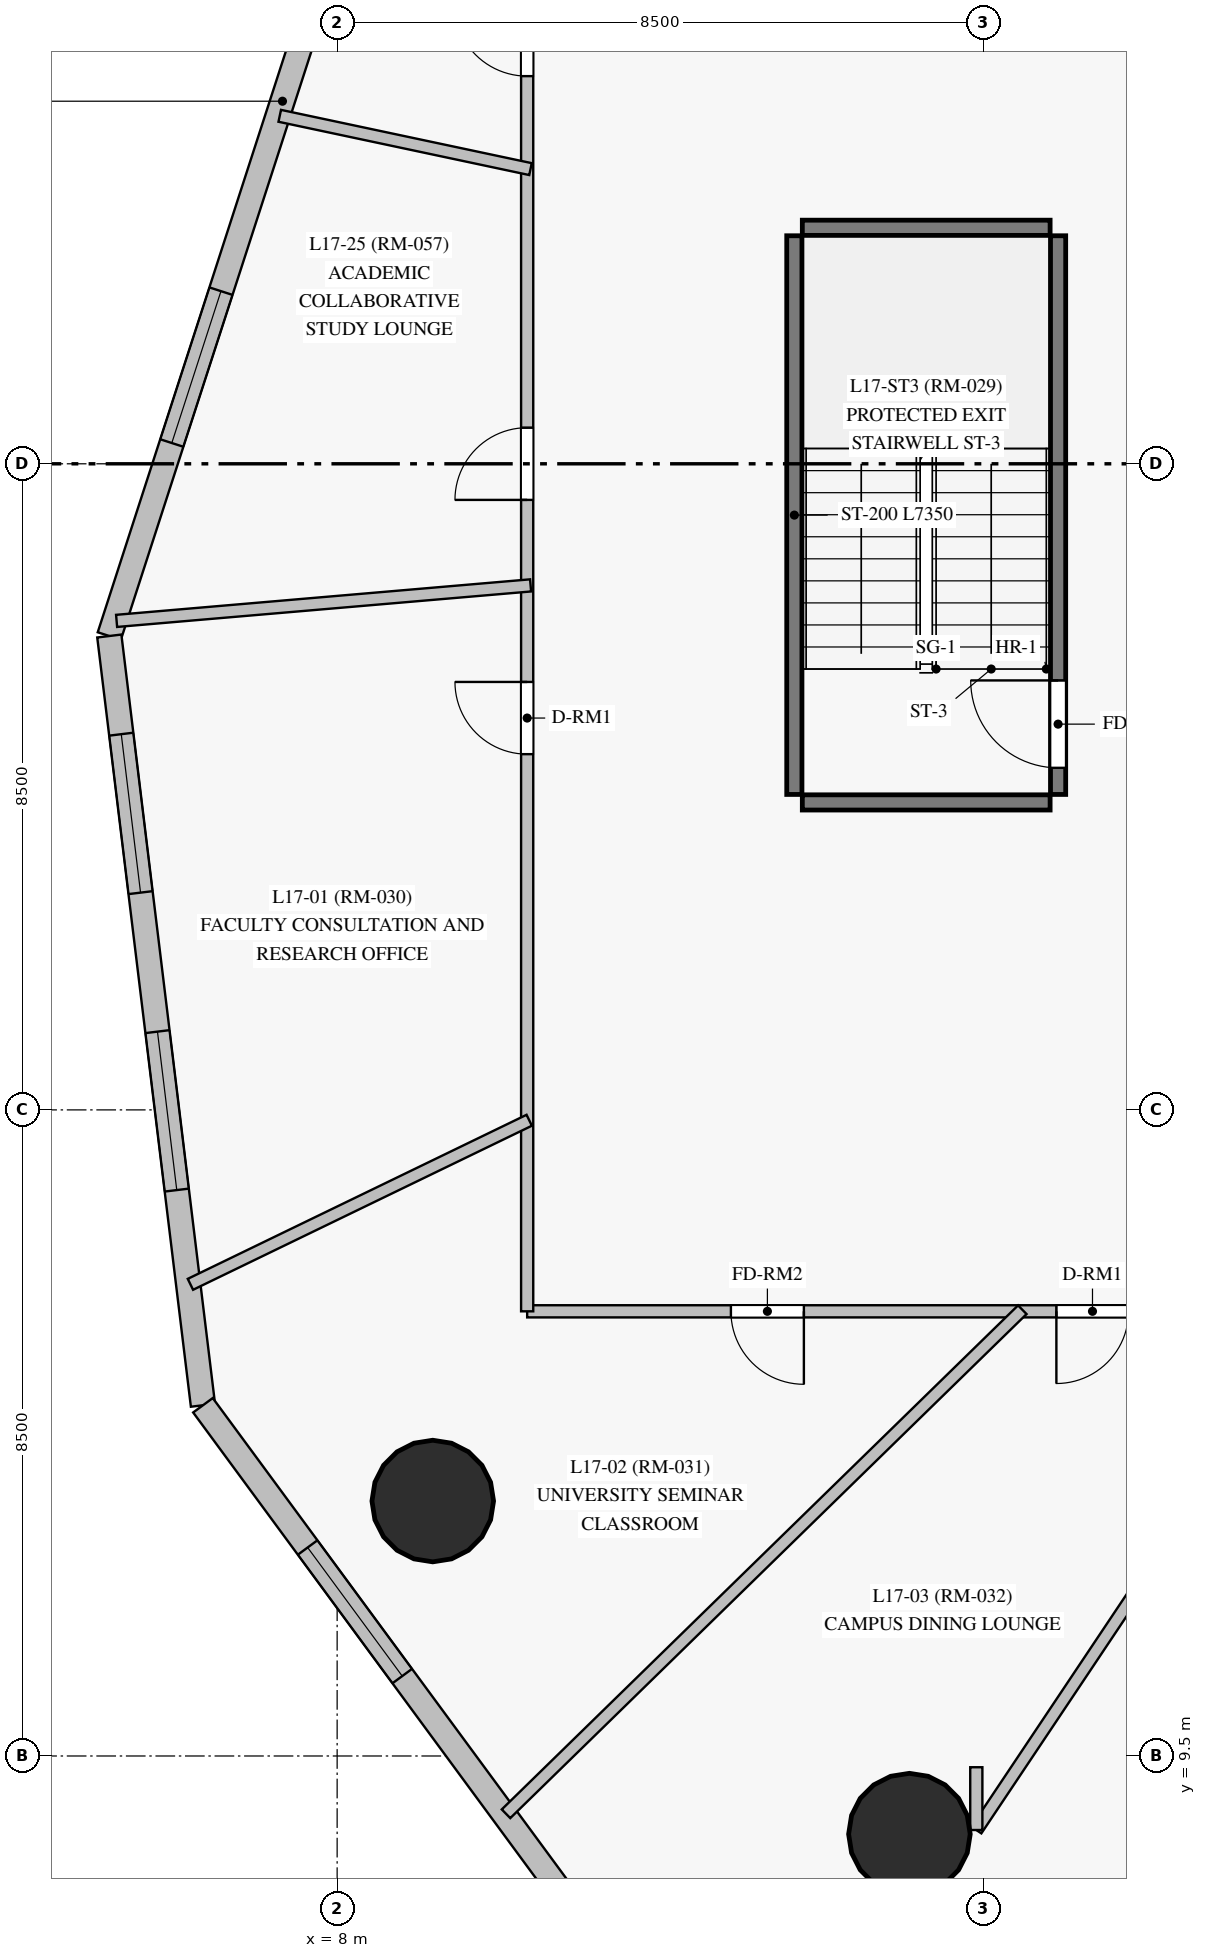
"""IFC4 building model, lengths in metres.
Left out: names, types, materials, properties, quantities, classifications, styles, units other than length and angle.
Written with IfcOpenShell. Run it as: python <this file> out.ifc"""

import sys

from ifc_helpers import new_model, si_unit, direction, frame, frame_2d, origin, origin_with_axes, origin_2d, place, context, subcontext, project, spatial, rectangle, circle, extrude, source, transform, mapped, element, fill, save


model = new_model("IFC4")
c1 = context("Model", 3, precision=1e-05, world=origin(), true_north=direction((0.0, 1.0)))
c2 = subcontext(c1, "Body", "Model", "MODEL_VIEW")
j1 = project(units=[si_unit("LENGTHUNIT", "METRE"), si_unit("PLANEANGLEUNIT", "RADIAN")], contexts=[c1])
p1 = place(None, origin())
s1 = spatial("IfcSite", under=j1, at=p1, CompositionType="ELEMENT")
p2 = place(p1, origin())
s2 = spatial("IfcBuilding", under=s1, at=p2, CompositionType="ELEMENT")
p3 = place(p2, frame((0.0, 0.0, 66.1)))
s3 = spatial("IfcBuildingStorey", under=s2, at=p3, CompositionType="ELEMENT", Elevation=66.1)
m1 = source(origin_with_axes(), c2, "Body", "SweptSolid", [
    extrude(circle(Radius=0.8, at=origin_2d()), origin(), (0.0, 0.0, 1.0), 3.6),
])
for number, where, z_axis, x_axis in (
    (1, (9.258, 12.854, 0.0), (0.0, 0.0, 1.0), (1.0, 0.0, 0.0)),
    (2, (15.529, 8.472, 0.0), (0.0, 0.0, 1.0), (1.0, 0.0, 0.0)),
):
    element("IfcColumn", number, at=place(p3, frame(where, z_axis=z_axis, x_axis=x_axis)), inside=s3, PredefinedType="COLUMN", context=c2, shape_type="MappedRepresentation", body=[
        mapped(m1, transform((0.0, 0.0, 0.0), scale=1.0)),
    ])
p4 = place(p3, frame((9.559, 38.306, 0.0), z_axis=(0.0, 0.0, 1.0), x_axis=(-0.30804045588, -0.95137325879, 0.0)))
e3 = element("IfcWall", 3, at=p4, inside=s3, PredefinedType="SOLIDWALL", context=c2, shape_type="SweptSolid", body=[
    extrude(rectangle(XDim=14.791, YDim=0.32, at=frame_2d((7.396, 0.0))), origin(), (0.0, 0.0, 1.0), 3.35),
])
p5 = place(p4, frame((1.052, 0.0, 0.85)))
e4 = element("IfcOpeningElement", 4, at=p5, cuts=e3, PredefinedType="OPENING", context=c2, shape_type="SweptSolid", body=[
    extrude(rectangle(XDim=2.1, YDim=1.95, at=frame_2d((1.05, 0.975))), frame((0.0, 0.17, 0.0), z_axis=(0.0, -1.0, 0.0), x_axis=(1.0, 0.0, 0.0)), (0.0, 0.0, 1.0), 0.34),
])
p6 = place(p4, frame((4.494, 0.0, 0.85)))
e5 = element("IfcOpeningElement", 5, at=p6, cuts=e3, PredefinedType="OPENING", context=c2, shape_type="SweptSolid", body=[
    extrude(rectangle(XDim=2.1, YDim=1.95, at=frame_2d((1.05, 0.975))), frame((0.0, 0.17, 0.0), z_axis=(0.0, -1.0, 0.0), x_axis=(1.0, 0.0, 0.0)), (0.0, 0.0, 1.0), 0.34),
])
p7 = place(p4, frame((10.022, 0.0, 0.85)))
e6 = element("IfcOpeningElement", 6, at=p7, cuts=e3, PredefinedType="OPENING", context=c2, shape_type="SweptSolid", body=[
    extrude(rectangle(XDim=2.1, YDim=1.95, at=frame_2d((1.05, 0.975))), frame((0.0, 0.17, 0.0), z_axis=(0.0, -1.0, 0.0), x_axis=(1.0, 0.0, 0.0)), (0.0, 0.0, 1.0), 0.34),
])
p8 = place(p3, frame((5.003, 24.234, 0.0), z_axis=(0.0, 0.0, 1.0), x_axis=(0.120836253114, -0.992672453498, 0.0)))
e7 = element("IfcWall", 7, at=p8, inside=s3, PredefinedType="SOLIDWALL", context=c2, shape_type="SweptSolid", body=[
    extrude(rectangle(XDim=10.195, YDim=0.32, at=frame_2d((5.098, 0.0))), origin(), (0.0, 0.0, 1.0), 3.35),
])
p9 = place(p8, frame((1.301, 0.0, 0.85)))
e8 = element("IfcOpeningElement", 8, at=p9, cuts=e7, PredefinedType="OPENING", context=c2, shape_type="SweptSolid", body=[
    extrude(rectangle(XDim=2.1, YDim=1.95, at=frame_2d((1.05, 0.975))), frame((0.0, 0.17, 0.0), z_axis=(0.0, -1.0, 0.0), x_axis=(1.0, 0.0, 0.0)), (0.0, 0.0, 1.0), 0.34),
])
p10 = place(p8, frame((5.243, 0.0, 0.85)))
e9 = element("IfcOpeningElement", 9, at=p10, cuts=e7, PredefinedType="OPENING", context=c2, shape_type="SweptSolid", body=[
    extrude(rectangle(XDim=2.1, YDim=1.95, at=frame_2d((1.05, 0.975))), frame((0.0, 0.17, 0.0), z_axis=(0.0, -1.0, 0.0), x_axis=(1.0, 0.0, 0.0)), (0.0, 0.0, 1.0), 0.34),
])
p11 = place(p3, frame((6.235, 14.114, 0.0), z_axis=(0.0, 0.0, 1.0), x_axis=(0.59272320353, -0.805406235385, 0.0)))
e10 = element("IfcWall", 10, at=p11, inside=s3, PredefinedType="SOLIDWALL", context=c2, shape_type="SweptSolid", body=[
    extrude(rectangle(XDim=12.674, YDim=0.32, at=frame_2d((6.337, 0.0))), origin(), (0.0, 0.0, 1.0), 3.35),
])
p12 = place(p11, frame((2.323, 0.0, 0.85)))
e11 = element("IfcOpeningElement", 11, at=p12, cuts=e10, PredefinedType="OPENING", context=c2, shape_type="SweptSolid", body=[
    extrude(rectangle(XDim=2.1, YDim=1.95, at=frame_2d((1.05, 0.975))), frame((0.0, 0.17, 0.0), z_axis=(0.0, -1.0, 0.0), x_axis=(1.0, 0.0, 0.0)), (0.0, 0.0, 1.0), 0.34),
])
p13 = place(p11, frame((8.431, 0.0, 0.85)))
e12 = element("IfcOpeningElement", 12, at=p13, cuts=e10, PredefinedType="OPENING", context=c2, shape_type="SweptSolid", body=[
    extrude(rectangle(XDim=2.1, YDim=1.95, at=frame_2d((1.05, 0.975))), frame((0.0, 0.17, 0.0), z_axis=(0.0, -1.0, 0.0), x_axis=(1.0, 0.0, 0.0)), (0.0, 0.0, 1.0), 0.34),
])
p14 = place(p3, frame((14.015, 22.15, 0.0), z_axis=(0.0, 0.0, 1.0), x_axis=(0.0, 1.0, 0.0)))
e13 = element("IfcWall", 13, at=p14, inside=s3, PredefinedType="SHEAR", context=c2, shape_type="SweptSolid", body=[
    extrude(rectangle(XDim=7.35, YDim=0.2, at=frame_2d((3.675, 0.0))), origin(), (0.0, 0.0, 1.0), 3.35),
])
p15 = place(p3, frame((17.485, 22.15, 0.0), z_axis=(0.0, 0.0, 1.0), x_axis=(0.0, 1.0, 0.0)))
e14 = element("IfcWall", 14, at=p15, inside=s3, PredefinedType="SHEAR", context=c2, shape_type="SweptSolid", body=[
    extrude(rectangle(XDim=7.35, YDim=0.2, at=frame_2d((3.675, 0.0))), origin(), (0.0, 0.0, 1.0), 3.35),
])
p16 = place(p15, frame((0.35, 0.0, 0.0)))
e15 = element("IfcOpeningElement", 15, at=p16, cuts=e14, PredefinedType="OPENING", context=c2, shape_type="SweptSolid", body=[
    extrude(rectangle(XDim=1.15, YDim=2.15, at=frame_2d((0.575, 1.075))), frame((0.0, 0.11, 0.0), z_axis=(0.0, -1.0, 0.0), x_axis=(1.0, 0.0, 0.0)), (0.0, 0.0, 1.0), 0.22),
])
for number, where, z_axis, x_axis in (
    (16, (14.12, 22.045, 0.0), (0.0, 0.0, 1.0), (1.0, 0.0, 0.0)),
    (17, (14.12, 29.605, 0.0), (0.0, 0.0, 1.0), (1.0, 0.0, 0.0)),
):
    element("IfcWall", number, at=place(p3, frame(where, z_axis=z_axis, x_axis=x_axis)), inside=s3, PredefinedType="SHEAR", context=c2, shape_type="SweptSolid", body=[
        extrude(rectangle(XDim=3.26, YDim=0.2, at=frame_2d((1.63, 0.0))), origin(), (0.0, 0.0, 1.0), 3.35),
    ])
p17 = place(p3, frame((40.25, 15.35, 0.0), z_axis=(0.0, 0.0, 1.0), x_axis=(-1.0, 0.0, 0.0)))
e18 = element("IfcWall", 18, at=p17, inside=s3, PredefinedType="PARTITIONING", context=c2, shape_type="SweptSolid", body=[
    extrude(rectangle(XDim=29.75, YDim=0.16, at=frame_2d((14.875, 0.0))), origin(), (0.0, 0.0, 1.0), 2.7),
])
p18 = place(p17, frame((26.11, 0.0, 0.0)))
e19 = element("IfcOpeningElement", 19, at=p18, cuts=e18, PredefinedType="OPENING", context=c2, shape_type="SweptSolid", body=[
    extrude(rectangle(XDim=0.96, YDim=2.15, at=frame_2d((0.48, 1.075))), frame((0.0, 0.09, 0.0), z_axis=(0.0, -1.0, 0.0), x_axis=(1.0, 0.0, 0.0)), (0.0, 0.0, 1.0), 0.18),
])
p19 = place(p17, frame((21.837, 0.0, 0.0)))
e20 = element("IfcOpeningElement", 20, at=p19, cuts=e18, PredefinedType="OPENING", context=c2, shape_type="SweptSolid", body=[
    extrude(rectangle(XDim=0.95, YDim=2.15, at=frame_2d((0.475, 1.075))), frame((0.0, 0.09, 0.0), z_axis=(0.0, -1.0, 0.0), x_axis=(1.0, 0.0, 0.0)), (0.0, 0.0, 1.0), 0.18),
])
p20 = place(p17, frame((17.716, 0.0, 0.0)))
e21 = element("IfcOpeningElement", 21, at=p20, cuts=e18, PredefinedType="OPENING", context=c2, shape_type="SweptSolid", body=[
    extrude(rectangle(XDim=0.95, YDim=2.15, at=frame_2d((0.475, 1.075))), frame((0.0, 0.09, 0.0), z_axis=(0.0, -1.0, 0.0), x_axis=(1.0, 0.0, 0.0)), (0.0, 0.0, 1.0), 0.18),
])
p21 = place(p17, frame((15.589, 0.0, 0.0)))
e22 = element("IfcOpeningElement", 22, at=p21, cuts=e18, PredefinedType="OPENING", context=c2, shape_type="SweptSolid", body=[
    extrude(rectangle(XDim=0.95, YDim=2.15, at=frame_2d((0.475, 1.075))), frame((0.0, 0.09, 0.0), z_axis=(0.0, -1.0, 0.0), x_axis=(1.0, 0.0, 0.0)), (0.0, 0.0, 1.0), 0.18),
])
p22 = place(p17, frame((12.96, 0.0, 0.0)))
e23 = element("IfcOpeningElement", 23, at=p22, cuts=e18, PredefinedType="OPENING", context=c2, shape_type="SweptSolid", body=[
    extrude(rectangle(XDim=0.96, YDim=2.15, at=frame_2d((0.48, 1.075))), frame((0.0, 0.09, 0.0), z_axis=(0.0, -1.0, 0.0), x_axis=(1.0, 0.0, 0.0)), (0.0, 0.0, 1.0), 0.18),
])
p23 = place(p17, frame((11.281, 0.0, 0.0)))
e24 = element("IfcOpeningElement", 24, at=p23, cuts=e18, PredefinedType="OPENING", context=c2, shape_type="SweptSolid", body=[
    extrude(rectangle(XDim=0.95, YDim=2.15, at=frame_2d((0.475, 1.075))), frame((0.0, 0.09, 0.0), z_axis=(0.0, -1.0, 0.0), x_axis=(1.0, 0.0, 0.0)), (0.0, 0.0, 1.0), 0.18),
])
p24 = place(p17, frame((9.601, 0.0, 0.0)))
e25 = element("IfcOpeningElement", 25, at=p24, cuts=e18, PredefinedType="OPENING", context=c2, shape_type="SweptSolid", body=[
    extrude(rectangle(XDim=0.96, YDim=2.15, at=frame_2d((0.48, 1.075))), frame((0.0, 0.09, 0.0), z_axis=(0.0, -1.0, 0.0), x_axis=(1.0, 0.0, 0.0)), (0.0, 0.0, 1.0), 0.18),
])
p25 = place(p17, frame((8.498, 0.0, 0.0)))
e26 = element("IfcOpeningElement", 26, at=p25, cuts=e18, PredefinedType="OPENING", context=c2, shape_type="SweptSolid", body=[
    extrude(rectangle(XDim=0.95, YDim=2.15, at=frame_2d((0.475, 1.075))), frame((0.0, 0.09, 0.0), z_axis=(0.0, -1.0, 0.0), x_axis=(1.0, 0.0, 0.0)), (0.0, 0.0, 1.0), 0.18),
])
p26 = place(p17, frame((2.634, 0.0, 0.0)))
e27 = element("IfcOpeningElement", 27, at=p26, cuts=e18, PredefinedType="OPENING", context=c2, shape_type="SweptSolid", body=[
    extrude(rectangle(XDim=0.95, YDim=2.15, at=frame_2d((0.475, 1.075))), frame((0.0, 0.09, 0.0), z_axis=(0.0, -1.0, 0.0), x_axis=(1.0, 0.0, 0.0)), (0.0, 0.0, 1.0), 0.18),
])
p27 = place(p3, frame((10.5, 15.35, 0.0), z_axis=(0.0, 0.0, 1.0), x_axis=(0.0, 1.0, 0.0)))
e28 = element("IfcWall", 28, at=p27, inside=s3, PredefinedType="PARTITIONING", context=c2, shape_type="SweptSolid", body=[
    extrude(rectangle(XDim=22.3, YDim=0.16, at=frame_2d((11.15, 0.0))), origin(), (0.0, 0.0, 1.0), 2.75),
])
p28 = place(p27, frame((7.33, 0.0, 0.0)))
e29 = element("IfcOpeningElement", 29, at=p28, cuts=e28, PredefinedType="OPENING", context=c2, shape_type="SweptSolid", body=[
    extrude(rectangle(XDim=0.95, YDim=2.15, at=frame_2d((0.475, 1.075))), frame((0.0, 0.09, 0.0), z_axis=(0.0, -1.0, 0.0), x_axis=(1.0, 0.0, 0.0)), (0.0, 0.0, 1.0), 0.18),
])
p29 = place(p27, frame((16.25, 0.0, 0.0)))
e30 = element("IfcOpeningElement", 30, at=p29, cuts=e28, PredefinedType="OPENING", context=c2, shape_type="SweptSolid", body=[
    extrude(rectangle(XDim=0.96, YDim=2.15, at=frame_2d((0.48, 1.075))), frame((0.0, 0.09, 0.0), z_axis=(0.0, -1.0, 0.0), x_axis=(1.0, 0.0, 0.0)), (0.0, 0.0, 1.0), 0.18),
])
p30 = place(p27, frame((10.675, 0.0, 0.0)))
e31 = element("IfcOpeningElement", 31, at=p30, cuts=e28, PredefinedType="OPENING", context=c2, shape_type="SweptSolid", body=[
    extrude(rectangle(XDim=0.95, YDim=2.15, at=frame_2d((0.475, 1.075))), frame((0.0, 0.09, 0.0), z_axis=(0.0, -1.0, 0.0), x_axis=(1.0, 0.0, 0.0)), (0.0, 0.0, 1.0), 0.18),
])
p31 = place(p3, frame((23.113, 15.391, 0.0), z_axis=(0.0, 0.0, 1.0), x_axis=(-0.431926675658, -0.901908724237, 0.0)))
e32 = element("IfcWall", 32, at=p31, inside=s3, PredefinedType="PARTITIONING", context=c2, shape_type="SweptSolid", body=[
    extrude(rectangle(XDim=13.511, YDim=0.16, at=frame_2d((6.755, 0.0))), origin(), (0.0, 0.0, 1.0), 3.35),
])
p32 = place(p3, frame((17.014, 15.371, 0.0), z_axis=(0.0, 0.0, 1.0), x_axis=(-0.715555534785, -0.698555850765, 0.0)))
e33 = element("IfcWall", 33, at=p32, inside=s3, PredefinedType="PARTITIONING", context=c2, shape_type="SweptSolid", body=[
    extrude(rectangle(XDim=9.493, YDim=0.16, at=frame_2d((4.747, 0.0))), origin(), (0.0, 0.0, 1.0), 3.35),
])
p33 = place(p3, frame((20.997, 15.387, 0.0), z_axis=(0.0, 0.0, 1.0), x_axis=(-0.555846420045, -0.831285003668, 0.0)))
e34 = element("IfcWall", 34, at=p33, inside=s3, PredefinedType="PARTITIONING", context=c2, shape_type="SweptSolid", body=[
    extrude(rectangle(XDim=8.254, YDim=0.16, at=frame_2d((4.127, 0.0))), origin(), (0.0, 0.0, 1.0), 3.35),
])
p34 = place(p3, frame((5.099, 24.433, 0.0), z_axis=(0.0, 0.0, 1.0), x_axis=(0.996343608273, 0.085436609558, 0.0)))
e35 = element("IfcWall", 35, at=p34, inside=s3, PredefinedType="PARTITIONING", context=c2, shape_type="SweptSolid", body=[
    extrude(rectangle(XDim=5.467, YDim=0.16, at=frame_2d((2.733, 0.0))), origin(), (0.0, 0.0, 1.0), 3.35),
])
p35 = place(p3, frame((10.527, 17.864, 0.0), z_axis=(0.0, 0.0, 1.0), x_axis=(-0.900033897649, -0.43581989753, 0.0)))
e36 = element("IfcWall", 36, at=p35, inside=s3, PredefinedType="PARTITIONING", context=c2, shape_type="SweptSolid", body=[
    extrude(rectangle(XDim=4.953, YDim=0.16, at=frame_2d((2.476, 0.0))), origin(), (0.0, 0.0, 1.0), 3.35),
])
p36 = place(p3, frame((10.544, 30.377, 0.0), z_axis=(0.0, 0.0, 1.0), x_axis=(-0.978166393073, 0.207823260158, 0.0)))
e37 = element("IfcWall", 37, at=p36, inside=s3, PredefinedType="PARTITIONING", context=c2, shape_type="SweptSolid", body=[
    extrude(rectangle(XDim=3.373, YDim=0.16, at=frame_2d((1.687, 0.0))), origin(), (0.0, 0.0, 1.0), 3.35),
])
p37 = place(p3, frame((16.409, 8.526, 0.0), z_axis=(0.0, 0.0, 1.0), x_axis=(0.0, 1.0, 0.0)))
e38 = element("IfcWall", 38, at=p37, inside=s3, PredefinedType="PARTITIONING", context=c2, shape_type="SweptSolid", body=[
    extrude(rectangle(XDim=0.826, YDim=0.16, at=frame_2d((0.413, 0.0))), origin(), (0.0, 0.0, 1.0), 2.7),
])
m2 = source(origin_with_axes(), c2, "Body", "SweptSolid", [
    extrude(rectangle(XDim=2.1, YDim=1.95, at=frame_2d((1.05, 0.975))), frame((0.0, 0.03, 0.0), z_axis=(0.0, -1.0, 0.0), x_axis=(1.0, 0.0, 0.0)), (0.0, 0.0, 1.0), 0.06),
])
p38 = place(p7, origin())
e39 = element("IfcWindow", 39, at=p38, inside=s3, PartitioningType="SINGLE_PANEL", PredefinedType="WINDOW", context=c2, shape_type="MappedRepresentation", body=[
    mapped(m2, transform((0.0, 0.0, 0.0), scale=1.0)),
])
fill(e6, e39)
p39 = place(p9, origin())
e40 = element("IfcWindow", 40, at=p39, inside=s3, PartitioningType="SINGLE_PANEL", PredefinedType="WINDOW", context=c2, shape_type="MappedRepresentation", body=[
    mapped(m2, transform((0.0, 0.0, 0.0), scale=1.0)),
])
fill(e8, e40)
p40 = place(p10, origin())
e41 = element("IfcWindow", 41, at=p40, inside=s3, PartitioningType="SINGLE_PANEL", PredefinedType="WINDOW", context=c2, shape_type="MappedRepresentation", body=[
    mapped(m2, transform((0.0, 0.0, 0.0), scale=1.0)),
])
fill(e9, e41)
p41 = place(p12, origin())
e42 = element("IfcWindow", 42, at=p41, inside=s3, PartitioningType="SINGLE_PANEL", PredefinedType="WINDOW", context=c2, shape_type="MappedRepresentation", body=[
    mapped(m2, transform((0.0, 0.0, 0.0), scale=1.0)),
])
fill(e11, e42)
m3 = source(origin_with_axes(), c2, "Body", "SweptSolid", [
    extrude(rectangle(XDim=1.15, YDim=2.15, at=frame_2d((0.575, 1.075))), frame((0.0, 0.025, 0.0), z_axis=(0.0, -1.0, 0.0), x_axis=(1.0, 0.0, 0.0)), (0.0, 0.0, 1.0), 0.05),
])
p42 = place(p16, origin())
e43 = element("IfcDoor", 43, at=p42, inside=s3, OperationType="SINGLE_SWING_RIGHT", PredefinedType="DOOR", context=c2, shape_type="MappedRepresentation", body=[
    mapped(m3, transform((0.0, 0.0, 0.0), scale=1.0)),
])
fill(e15, e43)
m4 = source(origin_with_axes(), c2, "Body", "SweptSolid", [
    extrude(rectangle(XDim=0.95, YDim=2.15, at=frame_2d((0.475, 1.075))), frame((0.0, 0.025, 0.0), z_axis=(0.0, -1.0, 0.0), x_axis=(1.0, 0.0, 0.0)), (0.0, 0.0, 1.0), 0.05),
])
p43 = place(p28, origin())
e44 = element("IfcDoor", 44, at=p43, inside=s3, OperationType="SINGLE_SWING_RIGHT", PredefinedType="DOOR", context=c2, shape_type="MappedRepresentation", body=[
    mapped(m4, transform((0.0, 0.0, 0.0), scale=1.0)),
])
fill(e29, e44)
m5 = source(origin_with_axes(), c2, "Body", "SweptSolid", [
    extrude(rectangle(XDim=0.96, YDim=2.15, at=frame_2d((0.48, 1.075))), frame((0.0, 0.025, 0.0), z_axis=(0.0, -1.0, 0.0), x_axis=(1.0, 0.0, 0.0)), (0.0, 0.0, 1.0), 0.05),
])
p44 = place(p18, origin())
e45 = element("IfcDoor", 45, at=p44, inside=s3, OperationType="SINGLE_SWING_LEFT", PredefinedType="DOOR", context=c2, shape_type="MappedRepresentation", body=[
    mapped(m5, transform((0.0, 0.0, 0.0), scale=1.0)),
])
fill(e19, e45)
p45 = place(p19, origin())
e46 = element("IfcDoor", 46, at=p45, inside=s3, OperationType="SINGLE_SWING_RIGHT", PredefinedType="DOOR", context=c2, shape_type="MappedRepresentation", body=[
    mapped(m4, transform((0.0, 0.0, 0.0), scale=1.0)),
])
fill(e20, e46)
p46 = place(p29, origin())
e47 = element("IfcDoor", 47, at=p46, inside=s3, OperationType="SINGLE_SWING_RIGHT", PredefinedType="DOOR", context=c2, shape_type="MappedRepresentation", body=[
    mapped(m5, transform((0.0, 0.0, 0.0), scale=1.0)),
])
fill(e30, e47)
p47 = place(p30, origin())
e48 = element("IfcDoor", 48, at=p47, inside=s3, OperationType="SINGLE_SWING_LEFT", PredefinedType="DOOR", context=c2, shape_type="MappedRepresentation", body=[
    mapped(m4, transform((0.0, 0.0, 0.0), scale=1.0)),
])
fill(e31, e48)
save(model, sys.argv[1])
